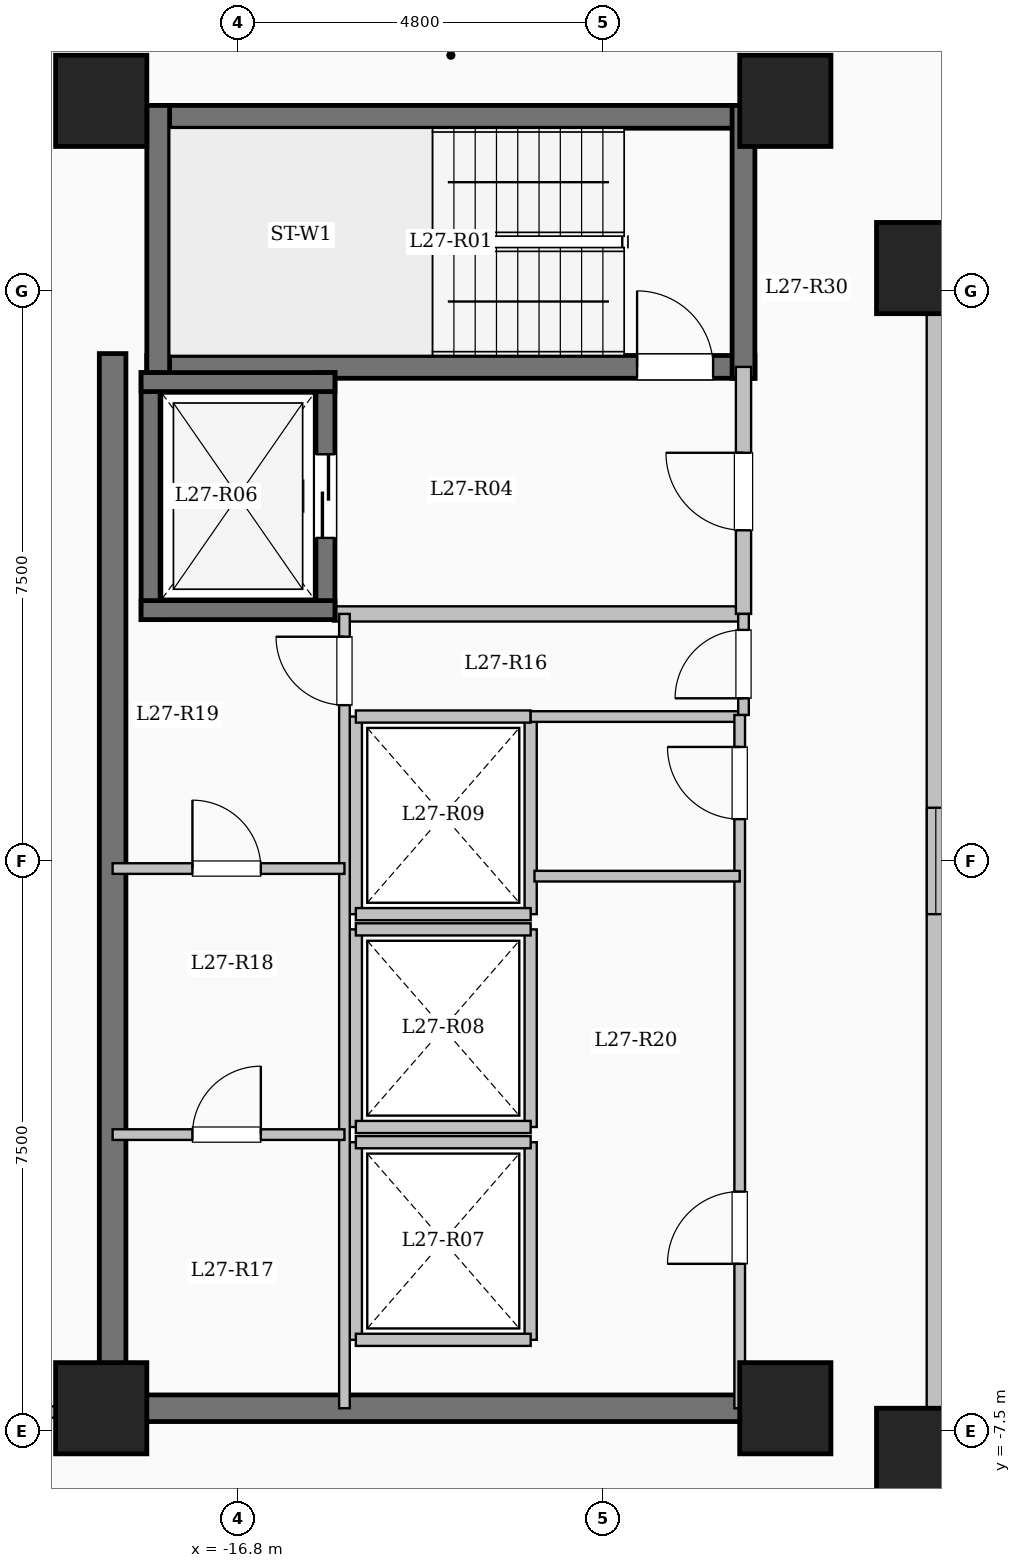
"""IFC4 building model, lengths in metres.
Left out: names, types, materials, properties, quantities, classifications, styles, units other than length and angle.
Written with IfcOpenShell. Run it as: python <this file> out.ifc"""

import sys

from ifc_helpers import new_model, si_unit, direction, frame, frame_2d, origin, origin_2d, place, context, subcontext, project, spatial, rectangle, extrude, element, fill, save


model = new_model("IFC4")
c1 = context("Model", 3, precision=1e-05, world=origin(), true_north=direction((0.0, 1.0)))
c2 = subcontext(c1, "Body", "Model", "MODEL_VIEW")
j1 = project(units=[si_unit("LENGTHUNIT", "METRE"), si_unit("PLANEANGLEUNIT", "RADIAN")], contexts=[c1])
p1 = place(None, origin())
s1 = spatial("IfcSite", under=j1, at=p1, CompositionType="ELEMENT")
p2 = place(p1, origin())
s2 = spatial("IfcBuilding", under=s1, at=p2, CompositionType="ELEMENT")
p3 = place(p2, frame((0.0, 0.0, 101.75)))
s3 = spatial("IfcBuildingStorey", under=s2, at=p3, CompositionType="ELEMENT", Elevation=101.75)
for number, where, z_axis, x_axis in (
    (1, (-7.8, -7.8, 0.0), (0.0, 0.0, 1.0), (1.0, 0.0, 0.0)),
    (2, (-7.8, 7.8, 0.0), (0.0, 0.0, 1.0), (1.0, 0.0, 0.0)),
    (3, (-9.6, -7.2, 0.0), (0.0, 0.0, 1.0), (1.0, 0.0, 0.0)),
    (4, (-9.6, 10.0, 0.0), (0.0, 0.0, 1.0), (1.0, 0.0, 0.0)),
    (5, (-18.6, -7.2, 0.0), (0.0, 0.0, 1.0), (1.0, 0.0, 0.0)),
    (6, (-18.6, 10.0, 0.0), (0.0, 0.0, 1.0), (1.0, 0.0, 0.0)),
):
    element("IfcColumn", number, at=place(p3, frame(where, z_axis=z_axis, x_axis=x_axis)), inside=s3, PredefinedType="COLUMN", context=c2, shape_type="SweptSolid", body=[
        extrude(rectangle(XDim=1.2, YDim=1.2, at=origin_2d()), origin(), (0.0, 0.0, 1.0), 3.35),
    ])
p4 = place(p3, frame((-7.62, -7.62, 0.0), z_axis=(0.0, 0.0, 1.0), x_axis=(1.0, 0.0, 0.0)))
e7 = element("IfcWall", 7, at=p4, inside=s3, PredefinedType="SOLIDWALL", context=c2, shape_type="SweptSolid", body=[
    extrude(rectangle(XDim=15.24, YDim=0.24, at=frame_2d((7.62, 0.0))), origin(), (0.0, 0.0, 1.0), 3.1),
])
p5 = place(p4, frame((6.92, 0.0, 0.95)))
e8 = element("IfcOpeningElement", 8, at=p5, cuts=e7, PredefinedType="OPENING", context=c2, shape_type="SweptSolid", body=[
    extrude(rectangle(XDim=1.4, YDim=1.5, at=frame_2d((0.7, 0.75))), frame((0.0, 0.13, 0.0), z_axis=(0.0, -1.0, 0.0), x_axis=(1.0, 0.0, 0.0)), (0.0, 0.0, 1.0), 0.26),
])
p6 = place(p3, frame((7.62, 7.62, 0.0), z_axis=(0.0, 0.0, 1.0), x_axis=(-1.0, 0.0, 0.0)))
e9 = element("IfcWall", 9, at=p6, inside=s3, PredefinedType="SOLIDWALL", context=c2, shape_type="SweptSolid", body=[
    extrude(rectangle(XDim=15.24, YDim=0.24, at=frame_2d((7.62, 0.0))), origin(), (0.0, 0.0, 1.0), 3.1),
])
p7 = place(p6, frame((6.92, 0.0, 0.95)))
e10 = element("IfcOpeningElement", 10, at=p7, cuts=e9, PredefinedType="OPENING", context=c2, shape_type="SweptSolid", body=[
    extrude(rectangle(XDim=1.4, YDim=1.5, at=frame_2d((0.7, 0.75))), frame((0.0, 0.13, 0.0), z_axis=(0.0, -1.0, 0.0), x_axis=(1.0, 0.0, 0.0)), (0.0, 0.0, 1.0), 0.26),
])
p8 = place(p3, frame((-7.62, 7.62, 0.0), z_axis=(0.0, 0.0, 1.0), x_axis=(0.0, -1.0, 0.0)))
e11 = element("IfcWall", 11, at=p8, inside=s3, PredefinedType="SOLIDWALL", context=c2, shape_type="SweptSolid", body=[
    extrude(rectangle(XDim=15.24, YDim=0.24, at=frame_2d((7.62, 0.0))), origin(), (0.0, 0.0, 1.0), 3.1),
])
p9 = place(p8, frame((6.92, 0.0, 0.95)))
e12 = element("IfcOpeningElement", 12, at=p9, cuts=e11, PredefinedType="OPENING", context=c2, shape_type="SweptSolid", body=[
    extrude(rectangle(XDim=1.4, YDim=1.5, at=frame_2d((0.7, 0.75))), frame((0.0, 0.13, 0.0), z_axis=(0.0, -1.0, 0.0), x_axis=(1.0, 0.0, 0.0)), (0.0, 0.0, 1.0), 0.26),
])
p10 = place(p3, frame((-18.0, 9.79, 0.0), z_axis=(0.0, 0.0, 1.0), x_axis=(1.0, 0.0, 0.0)))
e13 = element("IfcWall", 13, at=p10, inside=s3, PredefinedType="SHEAR", context=c2, shape_type="SweptSolid", body=[
    extrude(rectangle(XDim=8.0, YDim=0.3, at=frame_2d((4.0, 0.0))), origin(), (0.0, 0.0, 1.0), 3.35),
])
p11 = place(p3, frame((-18.0, 6.5, 0.0), z_axis=(0.0, 0.0, 1.0), x_axis=(1.0, 0.0, 0.0)))
e14 = element("IfcWall", 14, at=p11, inside=s3, PredefinedType="SHEAR", context=c2, shape_type="SweptSolid", body=[
    extrude(rectangle(XDim=8.0, YDim=0.3, at=frame_2d((4.0, 0.0))), origin(), (0.0, 0.0, 1.0), 3.35),
])
p12 = place(p11, frame((6.45, 0.0, 0.0)))
e15 = element("IfcOpeningElement", 15, at=p12, cuts=e14, PredefinedType="OPENING", context=c2, shape_type="SweptSolid", body=[
    extrude(rectangle(XDim=1.0, YDim=2.15, at=frame_2d((0.5, 1.075))), frame((0.0, 0.16, 0.0), z_axis=(0.0, -1.0, 0.0), x_axis=(1.0, 0.0, 0.0)), (0.0, 0.0, 1.0), 0.32),
])
for number, where, z_axis, x_axis in (
    (16, (-17.85, 6.35, 0.0), (0.0, 0.0, 1.0), (0.0, 1.0, 0.0)),
    (17, (-10.15, 6.35, 0.0), (0.0, 0.0, 1.0), (0.0, 1.0, 0.0)),
):
    element("IfcWall", number, at=place(p3, frame(where, z_axis=z_axis, x_axis=x_axis)), inside=s3, PredefinedType="SHEAR", context=c2, shape_type="SweptSolid", body=[
        extrude(rectangle(XDim=3.59, YDim=0.3, at=frame_2d((1.795, 0.0))), origin(), (0.0, 0.0, 1.0), 3.35),
    ])
p13 = place(p3, frame((-15.55, 3.25, 0.0), z_axis=(0.0, 0.0, 1.0), x_axis=(1.0, 0.0, 0.0)))
e18 = element("IfcWall", 18, at=p13, inside=s3, PredefinedType="SOLIDWALL", context=c2, shape_type="SweptSolid", body=[
    extrude(rectangle(XDim=5.4, YDim=0.2, at=frame_2d((2.7, 0.0))), origin(), (0.0, 0.0, 1.0), 3.1),
])
p14 = place(p3, frame((-10.15, 3.25, 0.0), z_axis=(0.0, 0.0, 1.0), x_axis=(0.0, 1.0, 0.0)))
e19 = element("IfcWall", 19, at=p14, inside=s3, PredefinedType="SOLIDWALL", context=c2, shape_type="SweptSolid", body=[
    extrude(rectangle(XDim=3.25, YDim=0.2, at=frame_2d((1.625, 0.0))), origin(), (0.0, 0.0, 1.0), 3.1),
])
p15 = place(p14, frame((1.1, 0.0, 0.0)))
e20 = element("IfcOpeningElement", 20, at=p15, cuts=e19, PredefinedType="OPENING", context=c2, shape_type="SweptSolid", body=[
    extrude(rectangle(XDim=1.02, YDim=2.15, at=frame_2d((0.51, 1.075))), frame((0.0, 0.11, 0.0), z_axis=(0.0, -1.0, 0.0), x_axis=(1.0, 0.0, 0.0)), (0.0, 0.0, 1.0), 0.22),
])
p16 = place(p3, frame((-17.95, 3.175, 0.0), z_axis=(0.0, 0.0, 1.0), x_axis=(0.0, 1.0, 0.0)))
e21 = element("IfcWall", 21, at=p16, inside=s3, PredefinedType="SHEAR", context=c2, shape_type="SweptSolid", body=[
    extrude(rectangle(XDim=3.25, YDim=0.25, at=frame_2d((1.625, 0.0))), origin(), (0.0, 0.0, 1.0), 3.35),
])
p17 = place(p3, frame((-15.65, 3.175, 0.0), z_axis=(0.0, 0.0, 1.0), x_axis=(0.0, 1.0, 0.0)))
e22 = element("IfcWall", 22, at=p17, inside=s3, PredefinedType="SHEAR", context=c2, shape_type="SweptSolid", body=[
    extrude(rectangle(XDim=3.25, YDim=0.25, at=frame_2d((1.625, 0.0))), origin(), (0.0, 0.0, 1.0), 3.35),
])
p18 = place(p17, frame((1.075, 0.0, 0.0)))
e23 = element("IfcOpeningElement", 23, at=p18, cuts=e22, PredefinedType="OPENING", context=c2, shape_type="SweptSolid", body=[
    extrude(rectangle(XDim=1.1, YDim=2.15, at=frame_2d((0.55, 1.075))), frame((0.0, 0.135, 0.0), z_axis=(0.0, -1.0, 0.0), x_axis=(1.0, 0.0, 0.0)), (0.0, 0.0, 1.0), 0.27),
])
for number, where, z_axis, x_axis in (
    (24, (-18.075, 3.3, 0.0), (0.0, 0.0, 1.0), (1.0, 0.0, 0.0)),
    (25, (-18.075, 6.3, 0.0), (0.0, 0.0, 1.0), (1.0, 0.0, 0.0)),
):
    element("IfcWall", number, at=place(p3, frame(where, z_axis=z_axis, x_axis=x_axis)), inside=s3, PredefinedType="SHEAR", context=c2, shape_type="SweptSolid", body=[
        extrude(rectangle(XDim=2.55, YDim=0.25, at=frame_2d((1.275, 0.0))), origin(), (0.0, 0.0, 1.0), 3.35),
    ])
for number, where, z_axis, x_axis in (
    (26, (-15.25, -6.3, 0.0), (0.0, 0.0, 1.0), (0.0, 1.0, 0.0)),
    (27, (-12.95, -6.3, 0.0), (0.0, 0.0, 1.0), (0.0, 1.0, 0.0)),
):
    element("IfcWall", number, at=place(p3, frame(where, z_axis=z_axis, x_axis=x_axis)), inside=s3, PredefinedType="SOLIDWALL", context=c2, shape_type="SweptSolid", body=[
        extrude(rectangle(XDim=2.6, YDim=0.16, at=frame_2d((1.3, 0.0))), origin(), (0.0, 0.0, 1.0), 3.1),
    ])
for number, where, z_axis, x_axis in (
    (28, (-15.25, -6.3, 0.0), (0.0, 0.0, 1.0), (1.0, 0.0, 0.0)),
    (29, (-15.25, -3.7, 0.0), (0.0, 0.0, 1.0), (1.0, 0.0, 0.0)),
):
    element("IfcWall", number, at=place(p3, frame(where, z_axis=z_axis, x_axis=x_axis)), inside=s3, PredefinedType="SOLIDWALL", context=c2, shape_type="SweptSolid", body=[
        extrude(rectangle(XDim=2.3, YDim=0.16, at=frame_2d((1.15, 0.0))), origin(), (0.0, 0.0, 1.0), 3.1),
    ])
for number, where, z_axis, x_axis in (
    (30, (-15.25, -3.5, 0.0), (0.0, 0.0, 1.0), (0.0, 1.0, 0.0)),
    (31, (-12.95, -3.5, 0.0), (0.0, 0.0, 1.0), (0.0, 1.0, 0.0)),
):
    element("IfcWall", number, at=place(p3, frame(where, z_axis=z_axis, x_axis=x_axis)), inside=s3, PredefinedType="SOLIDWALL", context=c2, shape_type="SweptSolid", body=[
        extrude(rectangle(XDim=2.6, YDim=0.16, at=frame_2d((1.3, 0.0))), origin(), (0.0, 0.0, 1.0), 3.1),
    ])
for number, where, z_axis, x_axis in (
    (32, (-15.25, -3.5, 0.0), (0.0, 0.0, 1.0), (1.0, 0.0, 0.0)),
    (33, (-15.25, -0.9, 0.0), (0.0, 0.0, 1.0), (1.0, 0.0, 0.0)),
):
    element("IfcWall", number, at=place(p3, frame(where, z_axis=z_axis, x_axis=x_axis)), inside=s3, PredefinedType="SOLIDWALL", context=c2, shape_type="SweptSolid", body=[
        extrude(rectangle(XDim=2.3, YDim=0.16, at=frame_2d((1.15, 0.0))), origin(), (0.0, 0.0, 1.0), 3.1),
    ])
for number, where, z_axis, x_axis in (
    (34, (-15.25, -0.7, 0.0), (0.0, 0.0, 1.0), (0.0, 1.0, 0.0)),
    (35, (-12.95, -0.7, 0.0), (0.0, 0.0, 1.0), (0.0, 1.0, 0.0)),
):
    element("IfcWall", number, at=place(p3, frame(where, z_axis=z_axis, x_axis=x_axis)), inside=s3, PredefinedType="SOLIDWALL", context=c2, shape_type="SweptSolid", body=[
        extrude(rectangle(XDim=2.6, YDim=0.16, at=frame_2d((1.3, 0.0))), origin(), (0.0, 0.0, 1.0), 3.1),
    ])
for number, where, z_axis, x_axis in (
    (36, (-15.25, -0.7, 0.0), (0.0, 0.0, 1.0), (1.0, 0.0, 0.0)),
    (37, (-15.25, 1.9, 0.0), (0.0, 0.0, 1.0), (1.0, 0.0, 0.0)),
):
    element("IfcWall", number, at=place(p3, frame(where, z_axis=z_axis, x_axis=x_axis)), inside=s3, PredefinedType="SOLIDWALL", context=c2, shape_type="SweptSolid", body=[
        extrude(rectangle(XDim=2.3, YDim=0.16, at=frame_2d((1.15, 0.0))), origin(), (0.0, 0.0, 1.0), 3.1),
    ])
p19 = place(p3, frame((-18.45, -7.375, 0.0), z_axis=(0.0, 0.0, 1.0), x_axis=(0.0, 1.0, 0.0)))
e38 = element("IfcWall", 38, at=p19, inside=s3, PredefinedType="SHEAR", context=c2, shape_type="SweptSolid", body=[
    extrude(rectangle(XDim=14.05, YDim=0.35, at=frame_2d((7.025, 0.0))), origin(), (0.0, 0.0, 1.0), 3.35),
])
p20 = place(p3, frame((-18.625, -7.2, 0.0), z_axis=(0.0, 0.0, 1.0), x_axis=(1.0, 0.0, 0.0)))
e39 = element("IfcWall", 39, at=p20, inside=s3, PredefinedType="SHEAR", context=c2, shape_type="SweptSolid", body=[
    extrude(rectangle(XDim=8.55, YDim=0.35, at=frame_2d((4.275, 0.0))), origin(), (0.0, 0.0, 1.0), 3.35),
])
p21 = place(p3, frame((-12.95, 1.9, 0.0), z_axis=(0.0, 0.0, 1.0), x_axis=(1.0, 0.0, 0.0)))
e40 = element("IfcWall", 40, at=p21, inside=s3, PredefinedType="PARTITIONING", context=c2, shape_type="SweptSolid", body=[
    extrude(rectangle(XDim=2.8, YDim=0.14, at=frame_2d((1.4, 0.0))), origin(), (0.0, 0.0, 1.0), 3.1),
])
p22 = place(p3, frame((-10.15, 1.92, 0.0), z_axis=(0.0, 0.0, 1.0), x_axis=(0.0, 1.0, 0.0)))
e41 = element("IfcWall", 41, at=p22, inside=s3, PredefinedType="PARTITIONING", context=c2, shape_type="SweptSolid", body=[
    extrude(rectangle(XDim=1.33, YDim=0.14, at=frame_2d((0.665, 0.0))), origin(), (0.0, 0.0, 1.0), 3.1),
])
p23 = place(p22, frame((0.22, 0.0, 0.0)))
e42 = element("IfcOpeningElement", 42, at=p23, cuts=e41, PredefinedType="OPENING", context=c2, shape_type="SweptSolid", body=[
    extrude(rectangle(XDim=0.9, YDim=2.08, at=frame_2d((0.45, 1.04))), frame((0.0, 0.08, 0.0), z_axis=(0.0, -1.0, 0.0), x_axis=(1.0, 0.0, 0.0)), (0.0, 0.0, 1.0), 0.16),
])
p24 = place(p3, frame((-15.4, -7.2, 0.0), z_axis=(0.0, 0.0, 1.0), x_axis=(0.0, 1.0, 0.0)))
e43 = element("IfcWall", 43, at=p24, inside=s3, PredefinedType="PARTITIONING", context=c2, shape_type="SweptSolid", body=[
    extrude(rectangle(XDim=10.45, YDim=0.14, at=frame_2d((5.225, 0.0))), origin(), (0.0, 0.0, 1.0), 3.1),
])
p25 = place(p24, frame((9.25, 0.0, 0.0)))
e44 = element("IfcOpeningElement", 44, at=p25, cuts=e43, PredefinedType="OPENING", context=c2, shape_type="SweptSolid", body=[
    extrude(rectangle(XDim=0.9, YDim=2.08, at=frame_2d((0.45, 1.04))), frame((0.0, 0.08, 0.0), z_axis=(0.0, -1.0, 0.0), x_axis=(1.0, 0.0, 0.0)), (0.0, 0.0, 1.0), 0.16),
])
p26 = place(p3, frame((-18.45, -3.6, 0.0), z_axis=(0.0, 0.0, 1.0), x_axis=(1.0, 0.0, 0.0)))
e45 = element("IfcWall", 45, at=p26, inside=s3, PredefinedType="PARTITIONING", context=c2, shape_type="SweptSolid", body=[
    extrude(rectangle(XDim=3.05, YDim=0.14, at=frame_2d((1.525, 0.0))), origin(), (0.0, 0.0, 1.0), 3.1),
])
p27 = place(p26, frame((1.05, 0.0, 0.0)))
e46 = element("IfcOpeningElement", 46, at=p27, cuts=e45, PredefinedType="OPENING", context=c2, shape_type="SweptSolid", body=[
    extrude(rectangle(XDim=0.9, YDim=2.08, at=frame_2d((0.45, 1.04))), frame((0.0, 0.08, 0.0), z_axis=(0.0, -1.0, 0.0), x_axis=(1.0, 0.0, 0.0)), (0.0, 0.0, 1.0), 0.16),
])
p28 = place(p3, frame((-18.45, -0.1, 0.0), z_axis=(0.0, 0.0, 1.0), x_axis=(1.0, 0.0, 0.0)))
e47 = element("IfcWall", 47, at=p28, inside=s3, PredefinedType="PARTITIONING", context=c2, shape_type="SweptSolid", body=[
    extrude(rectangle(XDim=3.05, YDim=0.14, at=frame_2d((1.525, 0.0))), origin(), (0.0, 0.0, 1.0), 3.1),
])
p29 = place(p28, frame((1.05, 0.0, 0.0)))
e48 = element("IfcOpeningElement", 48, at=p29, cuts=e47, PredefinedType="OPENING", context=c2, shape_type="SweptSolid", body=[
    extrude(rectangle(XDim=0.9, YDim=2.08, at=frame_2d((0.45, 1.04))), frame((0.0, 0.08, 0.0), z_axis=(0.0, -1.0, 0.0), x_axis=(1.0, 0.0, 0.0)), (0.0, 0.0, 1.0), 0.16),
])
p30 = place(p3, frame((-10.2, -7.2, 0.0), z_axis=(0.0, 0.0, 1.0), x_axis=(0.0, 1.0, 0.0)))
e49 = element("IfcWall", 49, at=p30, inside=s3, PredefinedType="PARTITIONING", context=c2, shape_type="SweptSolid", body=[
    extrude(rectangle(XDim=9.12, YDim=0.14, at=frame_2d((4.56, 0.0))), origin(), (0.0, 0.0, 1.0), 3.1),
])
p31 = place(p30, frame((1.9, 0.0, 0.0)))
e50 = element("IfcOpeningElement", 50, at=p31, cuts=e49, PredefinedType="OPENING", context=c2, shape_type="SweptSolid", body=[
    extrude(rectangle(XDim=0.95, YDim=2.12, at=frame_2d((0.475, 1.06))), frame((0.0, 0.08, 0.0), z_axis=(0.0, -1.0, 0.0), x_axis=(1.0, 0.0, 0.0)), (0.0, 0.0, 1.0), 0.16),
])
p32 = place(p30, frame((7.75, 0.0, 0.0)))
e51 = element("IfcOpeningElement", 51, at=p32, cuts=e49, PredefinedType="OPENING", context=c2, shape_type="SweptSolid", body=[
    extrude(rectangle(XDim=0.95, YDim=2.12, at=frame_2d((0.475, 1.06))), frame((0.0, 0.08, 0.0), z_axis=(0.0, -1.0, 0.0), x_axis=(1.0, 0.0, 0.0)), (0.0, 0.0, 1.0), 0.16),
])
p33 = place(p3, frame((-12.9, -0.2, 0.0), z_axis=(0.0, 0.0, 1.0), x_axis=(1.0, 0.0, 0.0)))
e52 = element("IfcWall", 52, at=p33, inside=s3, PredefinedType="PARTITIONING", context=c2, shape_type="SweptSolid", body=[
    extrude(rectangle(XDim=2.7, YDim=0.14, at=frame_2d((1.35, 0.0))), origin(), (0.0, 0.0, 1.0), 3.1),
])
p34 = place(p3, frame((-26.88, -7.25, 0.0), z_axis=(0.0, 0.0, 1.0), x_axis=(1.0, 0.0, 0.0)))
e53 = element("IfcWall", 53, at=p34, inside=s3, PredefinedType="PARTITIONING", context=c2, shape_type="SweptSolid", body=[
    extrude(rectangle(XDim=8.43, YDim=0.15, at=frame_2d((4.215, 0.0))), origin(), (0.0, 0.0, 1.0), 3.1),
])
p35 = place(p34, frame((5.23, 0.0, 0.0)))
e54 = element("IfcOpeningElement", 54, at=p35, cuts=e53, PredefinedType="OPENING", context=c2, shape_type="SweptSolid", body=[
    extrude(rectangle(XDim=1.08, YDim=2.15, at=frame_2d((0.54, 1.075))), frame((0.0, 0.085, 0.0), z_axis=(0.0, -1.0, 0.0), x_axis=(1.0, 0.0, 0.0)), (0.0, 0.0, 1.0), 0.17),
])
p36 = place(p9, origin())
e55 = element("IfcWindow", 55, at=p36, inside=s3, PartitioningType="SINGLE_PANEL", PredefinedType="WINDOW", context=c2, shape_type="SweptSolid", body=[
    extrude(rectangle(XDim=1.4, YDim=1.5, at=frame_2d((0.7, 0.75))), frame((0.0, 0.03, 0.0), z_axis=(0.0, -1.0, 0.0), x_axis=(1.0, 0.0, 0.0)), (0.0, 0.0, 1.0), 0.06),
])
fill(e12, e55)
p37 = place(p12, origin())
e56 = element("IfcDoor", 56, at=p37, inside=s3, OperationType="SINGLE_SWING_LEFT", PredefinedType="DOOR", context=c2, shape_type="SweptSolid", body=[
    extrude(rectangle(XDim=1.0, YDim=2.15, at=frame_2d((0.5, 1.075))), frame((0.0, 0.025, 0.0), z_axis=(0.0, -1.0, 0.0), x_axis=(1.0, 0.0, 0.0)), (0.0, 0.0, 1.0), 0.05),
])
fill(e15, e56)
p38 = place(p15, origin())
e57 = element("IfcDoor", 57, at=p38, inside=s3, OperationType="SINGLE_SWING_RIGHT", PredefinedType="DOOR", context=c2, shape_type="SweptSolid", body=[
    extrude(rectangle(XDim=1.02, YDim=2.15, at=frame_2d((0.51, 1.075))), frame((0.0, 0.025, 0.0), z_axis=(0.0, -1.0, 0.0), x_axis=(1.0, 0.0, 0.0)), (0.0, 0.0, 1.0), 0.05),
])
fill(e20, e57)
p39 = place(p18, origin())
e58 = element("IfcDoor", 58, at=p39, inside=s3, OperationType="SLIDING_TO_LEFT", PredefinedType="DOOR", context=c2, shape_type="SweptSolid", body=[
    extrude(rectangle(XDim=1.1, YDim=2.15, at=frame_2d((0.55, 1.075))), frame((0.0, 0.025, 0.0), z_axis=(0.0, -1.0, 0.0), x_axis=(1.0, 0.0, 0.0)), (0.0, 0.0, 1.0), 0.05),
])
fill(e23, e58)
p40 = place(p23, origin())
e59 = element("IfcDoor", 59, at=p40, inside=s3, OperationType="SINGLE_SWING_LEFT", PredefinedType="DOOR", context=c2, shape_type="SweptSolid", body=[
    extrude(rectangle(XDim=0.9, YDim=2.08, at=frame_2d((0.45, 1.04))), frame((0.0, 0.025, 0.0), z_axis=(0.0, -1.0, 0.0), x_axis=(1.0, 0.0, 0.0)), (0.0, 0.0, 1.0), 0.05),
])
fill(e42, e59)
p41 = place(p25, origin())
e60 = element("IfcDoor", 60, at=p41, inside=s3, OperationType="SINGLE_SWING_RIGHT", PredefinedType="DOOR", context=c2, shape_type="SweptSolid", body=[
    extrude(rectangle(XDim=0.9, YDim=2.08, at=frame_2d((0.45, 1.04))), frame((0.0, 0.025, 0.0), z_axis=(0.0, -1.0, 0.0), x_axis=(1.0, 0.0, 0.0)), (0.0, 0.0, 1.0), 0.05),
])
fill(e44, e60)
p42 = place(p29, origin())
e61 = element("IfcDoor", 61, at=p42, inside=s3, OperationType="SINGLE_SWING_LEFT", PredefinedType="DOOR", context=c2, shape_type="SweptSolid", body=[
    extrude(rectangle(XDim=0.9, YDim=2.08, at=frame_2d((0.45, 1.04))), frame((0.0, 0.025, 0.0), z_axis=(0.0, -1.0, 0.0), x_axis=(1.0, 0.0, 0.0)), (0.0, 0.0, 1.0), 0.05),
])
fill(e48, e61)
p43 = place(p27, origin())
e62 = element("IfcDoor", 62, at=p43, inside=s3, OperationType="SINGLE_SWING_RIGHT", PredefinedType="DOOR", context=c2, shape_type="SweptSolid", body=[
    extrude(rectangle(XDim=0.9, YDim=2.08, at=frame_2d((0.45, 1.04))), frame((0.0, 0.025, 0.0), z_axis=(0.0, -1.0, 0.0), x_axis=(1.0, 0.0, 0.0)), (0.0, 0.0, 1.0), 0.05),
])
fill(e46, e62)
p44 = place(p31, origin())
e63 = element("IfcDoor", 63, at=p44, inside=s3, OperationType="SINGLE_SWING_LEFT", PredefinedType="DOOR", context=c2, shape_type="SweptSolid", body=[
    extrude(rectangle(XDim=0.95, YDim=2.12, at=frame_2d((0.475, 1.06))), frame((0.0, 0.025, 0.0), z_axis=(0.0, -1.0, 0.0), x_axis=(1.0, 0.0, 0.0)), (0.0, 0.0, 1.0), 0.05),
])
fill(e50, e63)
p45 = place(p32, origin())
e64 = element("IfcDoor", 64, at=p45, inside=s3, OperationType="SINGLE_SWING_RIGHT", PredefinedType="DOOR", context=c2, shape_type="SweptSolid", body=[
    extrude(rectangle(XDim=0.95, YDim=2.12, at=frame_2d((0.475, 1.06))), frame((0.0, 0.025, 0.0), z_axis=(0.0, -1.0, 0.0), x_axis=(1.0, 0.0, 0.0)), (0.0, 0.0, 1.0), 0.05),
])
fill(e51, e64)
save(model, sys.argv[1])
